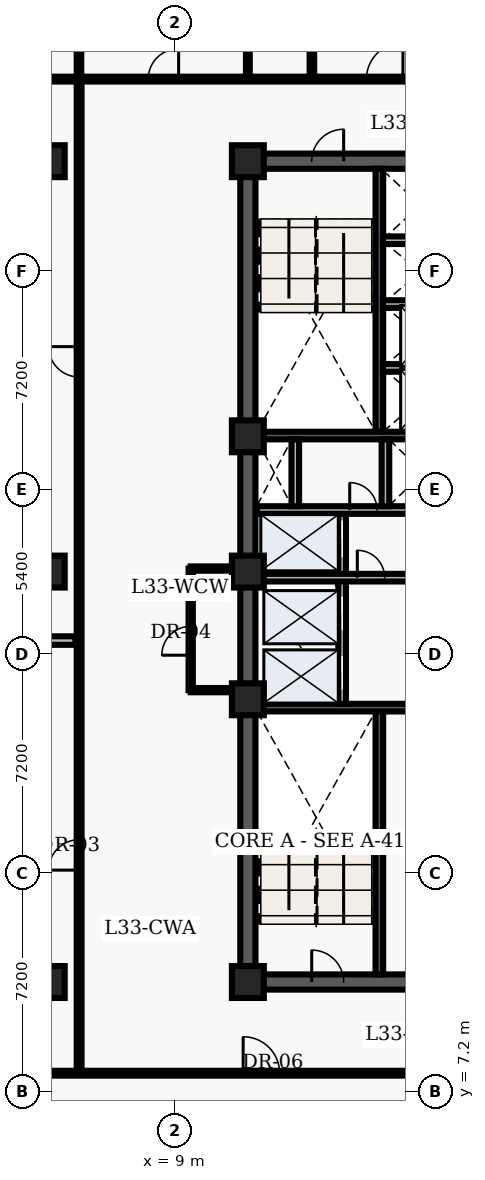
"""IFC4 building model, lengths in metres.
Left out: names, types, materials, properties, quantities, classifications, styles, units other than length and angle.
Written with IfcOpenShell. Run it as: python <this file> out.ifc"""

import sys

from ifc_helpers import new_model, entity, si_unit, converted_unit, direction, frame, origin_with_axes, origin_2d_with_axis, place, context, subcontext, project, spatial, polyline, rectangle, outline, extrude, element, fill, save


model = new_model("IFC4")
c1 = context("Model", 3, precision=1e-05, world=origin_with_axes(), true_north=direction((0.0, 1.0)))
c2 = subcontext(c1, "Body", "Model", "MODEL_VIEW")
j1 = project(units=[si_unit("LENGTHUNIT", "METRE"), converted_unit("PLANEANGLEUNIT", "DEGREE", entity("IfcPlaneAngleMeasure", 0.017), si_unit("PLANEANGLEUNIT", "RADIAN"), dimensions=[0, 0, 0, 0, 0, 0, 0])], contexts=[c1])
p1 = place(None, origin_with_axes())
s1 = spatial("IfcSite", under=j1, at=p1, CompositionType="ELEMENT")
p2 = place(p1, origin_with_axes())
s2 = spatial("IfcBuilding", under=s1, at=p2, CompositionType="ELEMENT")
p3 = place(p2, frame((0.0, 0.0, 136.8), z_axis=(0.0, 0.0, 1.0), x_axis=(1.0, 0.0, 0.0)))
s3 = spatial("IfcBuildingStorey", under=s2, at=p3, CompositionType="ELEMENT", Elevation=136.8)
p4 = place(p3, frame((11.4, 10.8, 0.0), z_axis=(0.0, 0.0, 1.0), x_axis=(0.0, 1.0, 0.0)))
e1 = element("IfcWall", 1, at=p4, inside=s3, PredefinedType="SHEAR", context=c2, shape_type="SweptSolid", body=[
    extrude(outline(polyline([(0.0, -0.25), (27.0, -0.25), (27.0, 0.25), (0.0, 0.25), (0.0, -0.25)])), origin_with_axes(), (0.0, 0.0, 1.0), 3.66),
])
p5 = place(p3, frame((11.4, 10.8, 0.0), z_axis=(0.0, 0.0, 1.0), x_axis=(1.0, 0.0, 0.0)))
e2 = element("IfcWall", 2, at=p5, inside=s3, PredefinedType="SHEAR", context=c2, shape_type="SweptSolid", body=[
    extrude(outline(polyline([(0.0, -0.25), (7.2, -0.25), (7.2, 0.25), (0.0, 0.25), (0.0, -0.25)])), origin_with_axes(), (0.0, 0.0, 1.0), 3.66),
])
p6 = place(p5, frame((2.625, 0.0, 0.0), z_axis=(0.0, 0.0, 1.0), x_axis=(1.0, 0.0, 0.0)))
e3 = element("IfcOpeningElement", 3, at=p6, cuts=e2, PredefinedType="OPENING", context=c2, shape_type="SweptSolid", body=[
    extrude(rectangle(XDim=1.05, YDim=0.52, at=origin_2d_with_axis()), origin_with_axes(), (0.0, 0.0, 1.0), 2.15),
])
p7 = place(p3, frame((11.4, 37.8, 0.0), z_axis=(0.0, 0.0, 1.0), x_axis=(1.0, 0.0, 0.0)))
e4 = element("IfcWall", 4, at=p7, inside=s3, PredefinedType="SHEAR", context=c2, shape_type="SweptSolid", body=[
    extrude(outline(polyline([(0.0, -0.25), (7.2, -0.25), (7.2, 0.25), (0.0, 0.25), (0.0, -0.25)])), origin_with_axes(), (0.0, 0.0, 1.0), 3.66),
])
p8 = place(p7, frame((2.625, 0.0, 0.0), z_axis=(0.0, 0.0, 1.0), x_axis=(1.0, 0.0, 0.0)))
e5 = element("IfcOpeningElement", 5, at=p8, cuts=e4, PredefinedType="OPENING", context=c2, shape_type="SweptSolid", body=[
    extrude(rectangle(XDim=1.05, YDim=0.52, at=origin_2d_with_axis()), origin_with_axes(), (0.0, 0.0, 1.0), 2.15),
])
p9 = place(p3, frame((15.725, 11.05, 0.0), z_axis=(0.0, 0.0, 1.0), x_axis=(0.0, 1.0, 0.0)))
e6 = element("IfcWall", 6, at=p9, inside=s3, PredefinedType="SHEAR", context=c2, shape_type="SweptSolid", body=[
    extrude(outline(polyline([(0.0, -0.125), (8.65, -0.125), (8.65, 0.125), (0.0, 0.125), (0.0, -0.125)])), origin_with_axes(), (0.0, 0.0, 1.0), 3.66),
])
p10 = place(p3, frame((11.65, 19.825, 0.0), z_axis=(0.0, 0.0, 1.0), x_axis=(1.0, 0.0, 0.0)))
e7 = element("IfcWall", 7, at=p10, inside=s3, PredefinedType="SHEAR", context=c2, shape_type="SweptSolid", body=[
    extrude(outline(polyline([(0.0, -0.125), (6.7, -0.125), (6.7, 0.125), (0.0, 0.125), (0.0, -0.125)])), origin_with_axes(), (0.0, 0.0, 1.0), 3.66),
])
p11 = place(p3, frame((15.725, 28.9, 0.0), z_axis=(0.0, 0.0, 1.0), x_axis=(0.0, 1.0, 0.0)))
e8 = element("IfcWall", 8, at=p11, inside=s3, PredefinedType="SHEAR", context=c2, shape_type="SweptSolid", body=[
    extrude(outline(polyline([(0.0, -0.125), (8.65, -0.125), (8.65, 0.125), (0.0, 0.125), (0.0, -0.125)])), origin_with_axes(), (0.0, 0.0, 1.0), 3.66),
])
p12 = place(p3, frame((11.65, 28.775, 0.0), z_axis=(0.0, 0.0, 1.0), x_axis=(1.0, 0.0, 0.0)))
e9 = element("IfcWall", 9, at=p12, inside=s3, PredefinedType="SHEAR", context=c2, shape_type="SweptSolid", body=[
    extrude(outline(polyline([(0.0, -0.125), (6.7, -0.125), (6.7, 0.125), (0.0, 0.125), (0.0, -0.125)])), origin_with_axes(), (0.0, 0.0, 1.0), 3.66),
])
p13 = place(p3, frame((14.5, 19.95, 0.0), z_axis=(0.0, 0.0, 1.0), x_axis=(0.0, 1.0, 0.0)))
e10 = element("IfcWall", 10, at=p13, inside=s3, PredefinedType="SOLIDWALL", context=c2, shape_type="SweptSolid", body=[
    extrude(outline(polyline([(0.0, -0.125), (6.25, -0.125), (6.25, 0.125), (0.0, 0.125), (0.0, -0.125)])), origin_with_axes(), (0.0, 0.0, 1.0), 2.7),
])
p14 = place(p13, frame((1.025, 0.0, 0.0), z_axis=(0.0, 0.0, 1.0), x_axis=(1.0, 0.0, 0.0)))
e11 = element("IfcOpeningElement", 11, at=p14, cuts=e10, PredefinedType="OPENING", context=c2, shape_type="SweptSolid", body=[
    extrude(rectangle(XDim=1.1, YDim=0.27, at=origin_2d_with_axis()), origin_with_axes(), (0.0, 0.0, 1.0), 2.15),
])
p15 = place(p13, frame((2.975, 0.0, 0.0), z_axis=(0.0, 0.0, 1.0), x_axis=(1.0, 0.0, 0.0)))
e12 = element("IfcOpeningElement", 12, at=p15, cuts=e10, PredefinedType="OPENING", context=c2, shape_type="SweptSolid", body=[
    extrude(rectangle(XDim=1.1, YDim=0.27, at=origin_2d_with_axis()), origin_with_axes(), (0.0, 0.0, 1.0), 2.15),
])
p16 = place(p13, frame((5.425, 0.0, 0.0), z_axis=(0.0, 0.0, 1.0), x_axis=(1.0, 0.0, 0.0)))
e13 = element("IfcOpeningElement", 13, at=p16, cuts=e10, PredefinedType="OPENING", context=c2, shape_type="SweptSolid", body=[
    extrude(rectangle(XDim=1.2, YDim=0.27, at=origin_2d_with_axis()), origin_with_axes(), (0.0, 0.0, 1.0), 2.15),
])
p17 = place(p3, frame((11.7, 24.1, 0.0), z_axis=(0.0, 0.0, 1.0), x_axis=(1.0, 0.0, 0.0)))
e14 = element("IfcWall", 14, at=p17, inside=s3, PredefinedType="SOLIDWALL", context=c2, shape_type="SweptSolid", body=[
    extrude(outline(polyline([(0.0, -0.125), (6.6, -0.125), (6.6, 0.125), (0.0, 0.125), (0.0, -0.125)])), origin_with_axes(), (0.0, 0.0, 1.0), 2.7),
])
p18 = place(p17, frame((3.75, 0.0, 0.0), z_axis=(0.0, 0.0, 1.0), x_axis=(1.0, 0.0, 0.0)))
e15 = element("IfcOpeningElement", 15, at=p18, cuts=e14, PredefinedType="OPENING", context=c2, shape_type="SweptSolid", body=[
    extrude(rectangle(XDim=0.9, YDim=0.27, at=origin_2d_with_axis()), origin_with_axes(), (0.0, 0.0, 1.0), 2.15),
])
p19 = place(p3, frame((11.7, 26.325, 0.0), z_axis=(0.0, 0.0, 1.0), x_axis=(1.0, 0.0, 0.0)))
e16 = element("IfcWall", 16, at=p19, inside=s3, PredefinedType="SOLIDWALL", context=c2, shape_type="SweptSolid", body=[
    extrude(outline(polyline([(0.0, -0.125), (6.6, -0.125), (6.6, 0.125), (0.0, 0.125), (0.0, -0.125)])), origin_with_axes(), (0.0, 0.0, 1.0), 2.7),
])
p20 = place(p19, frame((3.5, 0.0, 0.0), z_axis=(0.0, 0.0, 1.0), x_axis=(1.0, 0.0, 0.0)))
e17 = element("IfcOpeningElement", 17, at=p20, cuts=e16, PredefinedType="OPENING", context=c2, shape_type="SweptSolid", body=[
    extrude(rectangle(XDim=0.9, YDim=0.27, at=origin_2d_with_axis()), origin_with_axes(), (0.0, 0.0, 1.0), 2.15),
])
for number, where, z_axis, x_axis in (
    (18, (12.96, 26.45, 0.0), (0.0, 0.0, 1.0), (0.0, 1.0, 0.0)),
    (19, (15.925, 26.45, 0.0), (0.0, 0.0, 1.0), (0.0, 1.0, 0.0)),
):
    element("IfcWall", number, at=place(p3, frame(where, z_axis=z_axis, x_axis=x_axis)), inside=s3, PredefinedType="SOLIDWALL", context=c2, shape_type="SweptSolid", body=[
        extrude(outline(polyline([(0.0, -0.125), (2.2, -0.125), (2.2, 0.125), (0.0, 0.125), (0.0, -0.125)])), origin_with_axes(), (0.0, 0.0, 1.0), 2.7),
    ])
for number, where, z_axis, x_axis in (
    (20, (11.4, 10.8, 0.0), (0.0, 0.0, 1.0), (1.0, 0.0, 0.0)),
    (21, (11.4, 20.1, 0.0), (0.0, 0.0, 1.0), (1.0, 0.0, 0.0)),
    (22, (11.4, 24.3, 0.0), (0.0, 0.0, 1.0), (1.0, 0.0, 0.0)),
    (23, (11.4, 28.75, 0.0), (0.0, 0.0, 1.0), (1.0, 0.0, 0.0)),
    (24, (11.4, 37.8, 0.0), (0.0, 0.0, 1.0), (1.0, 0.0, 0.0)),
    (25, (4.85, 10.8, 0.0), (0.0, 0.0, 1.0), (1.0, 0.0, 0.0)),
    (26, (4.85, 24.3, 0.0), (0.0, 0.0, 1.0), (1.0, 0.0, 0.0)),
    (27, (4.85, 37.8, 0.0), (0.0, 0.0, 1.0), (1.0, 0.0, 0.0)),
):
    element("IfcColumn", number, at=place(p3, frame(where, z_axis=z_axis, x_axis=x_axis)), inside=s3, PredefinedType="COLUMN", context=c2, shape_type="SweptSolid", body=[
        extrude(rectangle(XDim=1.05, YDim=1.05, at=origin_2d_with_axis()), origin_with_axes(), (0.0, 0.0, 1.0), 3.9),
    ])
for number, where, z_axis, x_axis in (
    (28, (15.84, 31.0, 0.0), (0.0, 0.0, 1.0), (1.0, 0.0, 0.0)),
    (29, (15.84, 33.1, 0.0), (0.0, 0.0, 1.0), (1.0, 0.0, 0.0)),
    (30, (15.84, 35.2, 0.0), (0.0, 0.0, 1.0), (1.0, 0.0, 0.0)),
):
    element("IfcWall", number, at=place(p3, frame(where, z_axis=z_axis, x_axis=x_axis)), inside=s3, PredefinedType="SOLIDWALL", context=c2, shape_type="SweptSolid", body=[
        extrude(outline(polyline([(0.0, -0.125), (2.46, -0.125), (2.46, 0.125), (0.0, 0.125), (0.0, -0.125)])), origin_with_axes(), (0.0, 0.0, 1.0), 2.7),
    ])
p21 = place(p3, frame((9.52, 20.4, 0.0), z_axis=(0.0, 0.0, 1.0), x_axis=(0.0, 1.0, 0.0)))
e31 = element("IfcWall", 31, at=p21, inside=s3, PredefinedType="PARTITIONING", context=c2, shape_type="SweptSolid", body=[
    extrude(outline(polyline([(0.0, -0.07), (4.0, -0.07), (4.0, 0.07), (0.0, 0.07), (0.0, -0.07)])), origin_with_axes(), (0.0, 0.0, 1.0), 2.7),
])
p22 = place(p21, frame((1.625, 0.0, 0.0), z_axis=(0.0, 0.0, 1.0), x_axis=(1.0, 0.0, 0.0)))
e32 = element("IfcOpeningElement", 32, at=p22, cuts=e31, PredefinedType="OPENING", context=c2, shape_type="SweptSolid", body=[
    extrude(rectangle(XDim=0.95, YDim=0.16, at=origin_2d_with_axis()), origin_with_axes(), (0.0, 0.0, 1.0), 2.15),
])
for number, where, z_axis, x_axis in (
    (33, (9.52, 20.4, 0.0), (0.0, 0.0, 1.0), (1.0, 0.0, 0.0)),
    (34, (9.52, 24.4, 0.0), (0.0, 0.0, 1.0), (1.0, 0.0, 0.0)),
):
    element("IfcWall", number, at=place(p3, frame(where, z_axis=z_axis, x_axis=x_axis)), inside=s3, PredefinedType="PARTITIONING", context=c2, shape_type="SweptSolid", body=[
        extrude(outline(polyline([(0.0, -0.07), (1.58, -0.07), (1.58, 0.07), (0.0, 0.07), (0.0, -0.07)])), origin_with_axes(), (0.0, 0.0, 1.0), 2.7),
    ])
p23 = place(p3, frame((2.6, 7.8, 0.0), z_axis=(0.0, 0.0, 1.0), x_axis=(1.0, 0.0, 0.0)))
e35 = element("IfcWall", 35, at=p23, inside=s3, PredefinedType="PARTITIONING", context=c2, shape_type="SweptSolid", body=[
    extrude(outline(polyline([(0.0, -0.08), (18.55, -0.08), (18.55, 0.08), (0.0, 0.08), (0.0, -0.08)])), origin_with_axes(), (0.0, 0.0, 1.0), 2.7),
])
p24 = place(p23, frame((9.245, 0.0, 0.0), z_axis=(0.0, 0.0, 1.0), x_axis=(1.0, 0.0, 0.0)))
e36 = element("IfcOpeningElement", 36, at=p24, cuts=e35, PredefinedType="OPENING", context=c2, shape_type="SweptSolid", body=[
    extrude(rectangle(XDim=1.2, YDim=0.18, at=origin_2d_with_axis()), origin_with_axes(), (0.0, 0.0, 1.0), 2.2),
])
p25 = place(p3, frame((2.6, 40.5, 0.0), z_axis=(0.0, 0.0, 1.0), x_axis=(1.0, 0.0, 0.0)))
e37 = element("IfcWall", 37, at=p25, inside=s3, PredefinedType="PARTITIONING", context=c2, shape_type="SweptSolid", body=[
    extrude(outline(polyline([(0.0, -0.08), (18.89, -0.08), (18.89, 0.08), (0.0, 0.08), (0.0, -0.08)])), origin_with_axes(), (0.0, 0.0, 1.0), 2.7),
])
p26 = place(p25, frame((1.057, 0.0, 0.0), z_axis=(0.0, 0.0, 1.0), x_axis=(1.0, 0.0, 0.0)))
e38 = element("IfcOpeningElement", 38, at=p26, cuts=e37, PredefinedType="OPENING", context=c2, shape_type="SweptSolid", body=[
    extrude(rectangle(XDim=1.0, YDim=0.18, at=origin_2d_with_axis()), origin_with_axes(), (0.0, 0.0, 1.0), 2.15),
])
p27 = place(p25, frame((6.022, 0.0, 0.0), z_axis=(0.0, 0.0, 1.0), x_axis=(1.0, 0.0, 0.0)))
e39 = element("IfcOpeningElement", 39, at=p27, cuts=e37, PredefinedType="OPENING", context=c2, shape_type="SweptSolid", body=[
    extrude(rectangle(XDim=1.0, YDim=0.18, at=origin_2d_with_axis()), origin_with_axes(), (0.0, 0.0, 1.0), 2.15),
])
p28 = place(p25, frame((13.3, 0.0, 0.0), z_axis=(0.0, 0.0, 1.0), x_axis=(1.0, 0.0, 0.0)))
e40 = element("IfcOpeningElement", 40, at=p28, cuts=e37, PredefinedType="OPENING", context=c2, shape_type="SweptSolid", body=[
    extrude(rectangle(XDim=1.2, YDim=0.18, at=origin_2d_with_axis()), origin_with_axes(), (0.0, 0.0, 1.0), 2.2),
])
p29 = place(p3, frame((5.85, 7.8, 0.0), z_axis=(0.0, 0.0, 1.0), x_axis=(0.0, 1.0, 0.0)))
e41 = element("IfcWall", 41, at=p29, inside=s3, PredefinedType="PARTITIONING", context=c2, shape_type="SweptSolid", body=[
    extrude(outline(polyline([(0.0, -0.08), (32.7, -0.08), (32.7, 0.08), (0.0, 0.08), (0.0, -0.08)])), origin_with_axes(), (0.0, 0.0, 1.0), 2.7),
])
p30 = place(p29, frame((7.181, 0.0, 0.0), z_axis=(0.0, 0.0, 1.0), x_axis=(1.0, 0.0, 0.0)))
e42 = element("IfcOpeningElement", 42, at=p30, cuts=e41, PredefinedType="OPENING", context=c2, shape_type="SweptSolid", body=[
    extrude(rectangle(XDim=1.0, YDim=0.18, at=origin_2d_with_axis()), origin_with_axes(), (0.0, 0.0, 1.0), 2.15),
])
p31 = place(p29, frame((23.401, 0.0, 0.0), z_axis=(0.0, 0.0, 1.0), x_axis=(1.0, 0.0, 0.0)))
e43 = element("IfcOpeningElement", 43, at=p31, cuts=e41, PredefinedType="OPENING", context=c2, shape_type="SweptSolid", body=[
    extrude(rectangle(XDim=1.0, YDim=0.18, at=origin_2d_with_axis()), origin_with_axes(), (0.0, 0.0, 1.0), 2.15),
])
p32 = place(p3, frame((0.335, 22.031, 0.0), z_axis=(0.0, 0.0, 1.0), x_axis=(1.0, 0.0, 0.0)))
e44 = element("IfcWall", 44, at=p32, inside=s3, PredefinedType="PARTITIONING", context=c2, shape_type="SweptSolid", body=[
    extrude(outline(polyline([(0.0, -0.14), (5.395, -0.14), (5.395, 0.14), (0.0, 0.14), (0.0, -0.14)])), origin_with_axes(), (0.0, 0.0, 1.0), 2.7),
])
p33 = place(p3, frame((5.845, 40.6, 0.0), z_axis=(0.0, 0.0, 1.0), x_axis=(0.0, 1.0, 0.0)))
e45 = element("IfcWall", 45, at=p33, inside=s3, PredefinedType="PARTITIONING", context=c2, shape_type="SweptSolid", body=[
    extrude(outline(polyline([(0.0, -0.075), (7.665, -0.075), (7.665, 0.075), (0.0, 0.075), (0.0, -0.075)])), origin_with_axes(), (0.0, 0.0, 1.0), 2.7),
])
p34 = place(p3, frame((11.4, 40.6, 0.0), z_axis=(0.0, 0.0, 1.0), x_axis=(0.0, 1.0, 0.0)))
e46 = element("IfcWall", 46, at=p34, inside=s3, PredefinedType="PARTITIONING", context=c2, shape_type="SweptSolid", body=[
    extrude(outline(polyline([(0.0, -0.062), (7.665, -0.062), (7.665, 0.062), (0.0, 0.062), (0.0, -0.062)])), origin_with_axes(), (0.0, 0.0, 1.0), 2.7),
])
p35 = place(p34, frame((2.17, 0.0, 0.0), z_axis=(0.0, 0.0, 1.0), x_axis=(1.0, 0.0, 0.0)))
e47 = element("IfcOpeningElement", 47, at=p35, cuts=e46, PredefinedType="OPENING", context=c2, shape_type="SweptSolid", body=[
    extrude(rectangle(XDim=0.95, YDim=0.145, at=origin_2d_with_axis()), origin_with_axes(), (0.0, 0.0, 1.0), 2.15),
])
p36 = place(p3, frame((13.506, 40.6, 0.0), z_axis=(0.0, 0.0, 1.0), x_axis=(0.0, 1.0, 0.0)))
e48 = element("IfcWall", 48, at=p36, inside=s3, PredefinedType="PARTITIONING", context=c2, shape_type="SweptSolid", body=[
    extrude(outline(polyline([(0.0, -0.075), (7.665, -0.075), (7.665, 0.075), (0.0, 0.075), (0.0, -0.075)])), origin_with_axes(), (0.0, 0.0, 1.0), 2.7),
])
p37 = place(p13, frame((1.025, 0.0, 0.0), z_axis=(0.0, 0.0, 1.0), x_axis=(1.0, 0.0, 0.0)))
e49 = element("IfcDoor", 49, at=p37, inside=s3, OperationType="SLIDING_TO_LEFT", PredefinedType="DOOR", context=c2, shape_type="SweptSolid", body=[
    extrude(rectangle(XDim=1.1, YDim=0.09, at=origin_2d_with_axis()), origin_with_axes(), (0.0, 0.0, 1.0), 2.15),
])
fill(e11, e49)
p38 = place(p13, frame((2.975, 0.0, 0.0), z_axis=(0.0, 0.0, 1.0), x_axis=(1.0, 0.0, 0.0)))
e50 = element("IfcDoor", 50, at=p38, inside=s3, OperationType="SLIDING_TO_RIGHT", PredefinedType="DOOR", context=c2, shape_type="SweptSolid", body=[
    extrude(rectangle(XDim=1.1, YDim=0.09, at=origin_2d_with_axis()), origin_with_axes(), (0.0, 0.0, 1.0), 2.15),
])
fill(e12, e50)
p39 = place(p13, frame((5.425, 0.0, 0.0), z_axis=(0.0, 0.0, 1.0), x_axis=(1.0, 0.0, 0.0)))
e51 = element("IfcDoor", 51, at=p39, inside=s3, OperationType="DOUBLE_DOOR_SLIDING", PredefinedType="DOOR", context=c2, shape_type="SweptSolid", body=[
    extrude(rectangle(XDim=1.2, YDim=0.09, at=origin_2d_with_axis()), origin_with_axes(), (0.0, 0.0, 1.0), 2.15),
])
fill(e13, e51)
p40 = place(p5, frame((2.625, 0.0, 0.0), z_axis=(0.0, 0.0, 1.0), x_axis=(1.0, 0.0, 0.0)))
e52 = element("IfcDoor", 52, at=p40, inside=s3, OperationType="SINGLE_SWING_LEFT", PredefinedType="DOOR", context=c2, shape_type="SweptSolid", body=[
    extrude(rectangle(XDim=1.05, YDim=0.09, at=origin_2d_with_axis()), origin_with_axes(), (0.0, 0.0, 1.0), 2.15),
])
fill(e3, e52)
p41 = place(p7, frame((2.625, 0.0, 0.0), z_axis=(0.0, 0.0, 1.0), x_axis=(1.0, 0.0, 0.0)))
e53 = element("IfcDoor", 53, at=p41, inside=s3, OperationType="SINGLE_SWING_RIGHT", PredefinedType="DOOR", context=c2, shape_type="SweptSolid", body=[
    extrude(rectangle(XDim=1.05, YDim=0.09, at=origin_2d_with_axis()), origin_with_axes(), (0.0, 0.0, 1.0), 2.15),
])
fill(e5, e53)
p42 = place(p17, frame((3.75, 0.0, 0.0), z_axis=(0.0, 0.0, 1.0), x_axis=(1.0, 0.0, 0.0)))
e54 = element("IfcDoor", 54, at=p42, inside=s3, OperationType="SINGLE_SWING_LEFT", PredefinedType="DOOR", context=c2, shape_type="SweptSolid", body=[
    extrude(rectangle(XDim=0.9, YDim=0.09, at=origin_2d_with_axis()), origin_with_axes(), (0.0, 0.0, 1.0), 2.15),
])
fill(e15, e54)
p43 = place(p19, frame((3.5, 0.0, 0.0), z_axis=(0.0, 0.0, 1.0), x_axis=(1.0, 0.0, 0.0)))
e55 = element("IfcDoor", 55, at=p43, inside=s3, OperationType="SINGLE_SWING_LEFT", PredefinedType="DOOR", context=c2, shape_type="SweptSolid", body=[
    extrude(rectangle(XDim=0.9, YDim=0.09, at=origin_2d_with_axis()), origin_with_axes(), (0.0, 0.0, 1.0), 2.15),
])
fill(e17, e55)
p44 = place(p21, frame((1.625, 0.0, 0.0), z_axis=(0.0, 0.0, 1.0), x_axis=(1.0, 0.0, 0.0)))
e56 = element("IfcDoor", 56, at=p44, inside=s3, OperationType="SINGLE_SWING_LEFT", PredefinedType="DOOR", context=c2, shape_type="SweptSolid", body=[
    extrude(rectangle(XDim=0.95, YDim=0.084, at=origin_2d_with_axis()), origin_with_axes(), (0.0, 0.0, 1.0), 2.15),
])
fill(e32, e56)
p45 = place(p29, frame((7.181, 0.0, 0.0), z_axis=(0.0, 0.0, 1.0), x_axis=(1.0, 0.0, 0.0)))
e57 = element("IfcDoor", 57, at=p45, inside=s3, OperationType="SINGLE_SWING_LEFT", PredefinedType="DOOR", context=c2, shape_type="SweptSolid", body=[
    extrude(rectangle(XDim=1.0, YDim=0.09, at=origin_2d_with_axis()), origin_with_axes(), (0.0, 0.0, 1.0), 2.15),
])
fill(e42, e57)
p46 = place(p29, frame((23.401, 0.0, 0.0), z_axis=(0.0, 0.0, 1.0), x_axis=(1.0, 0.0, 0.0)))
e58 = element("IfcDoor", 58, at=p46, inside=s3, OperationType="SINGLE_SWING_RIGHT", PredefinedType="DOOR", context=c2, shape_type="SweptSolid", body=[
    extrude(rectangle(XDim=1.0, YDim=0.09, at=origin_2d_with_axis()), origin_with_axes(), (0.0, 0.0, 1.0), 2.15),
])
fill(e43, e58)
p47 = place(p23, frame((9.245, 0.0, 0.0), z_axis=(0.0, 0.0, 1.0), x_axis=(1.0, 0.0, 0.0)))
e59 = element("IfcDoor", 59, at=p47, inside=s3, OperationType="SINGLE_SWING_LEFT", PredefinedType="DOOR", context=c2, shape_type="SweptSolid", body=[
    extrude(rectangle(XDim=1.2, YDim=0.09, at=origin_2d_with_axis()), origin_with_axes(), (0.0, 0.0, 1.0), 2.2),
])
fill(e36, e59)
p48 = place(p25, frame((6.022, 0.0, 0.0), z_axis=(0.0, 0.0, 1.0), x_axis=(1.0, 0.0, 0.0)))
e60 = element("IfcDoor", 60, at=p48, inside=s3, OperationType="SINGLE_SWING_RIGHT", PredefinedType="DOOR", context=c2, shape_type="SweptSolid", body=[
    extrude(rectangle(XDim=1.0, YDim=0.09, at=origin_2d_with_axis()), origin_with_axes(), (0.0, 0.0, 1.0), 2.15),
])
fill(e39, e60)
p49 = place(p25, frame((13.3, 0.0, 0.0), z_axis=(0.0, 0.0, 1.0), x_axis=(1.0, 0.0, 0.0)))
e61 = element("IfcDoor", 61, at=p49, inside=s3, OperationType="SINGLE_SWING_RIGHT", PredefinedType="DOOR", context=c2, shape_type="SweptSolid", body=[
    extrude(rectangle(XDim=1.2, YDim=0.09, at=origin_2d_with_axis()), origin_with_axes(), (0.0, 0.0, 1.0), 2.2),
])
fill(e40, e61)
save(model, sys.argv[1])
